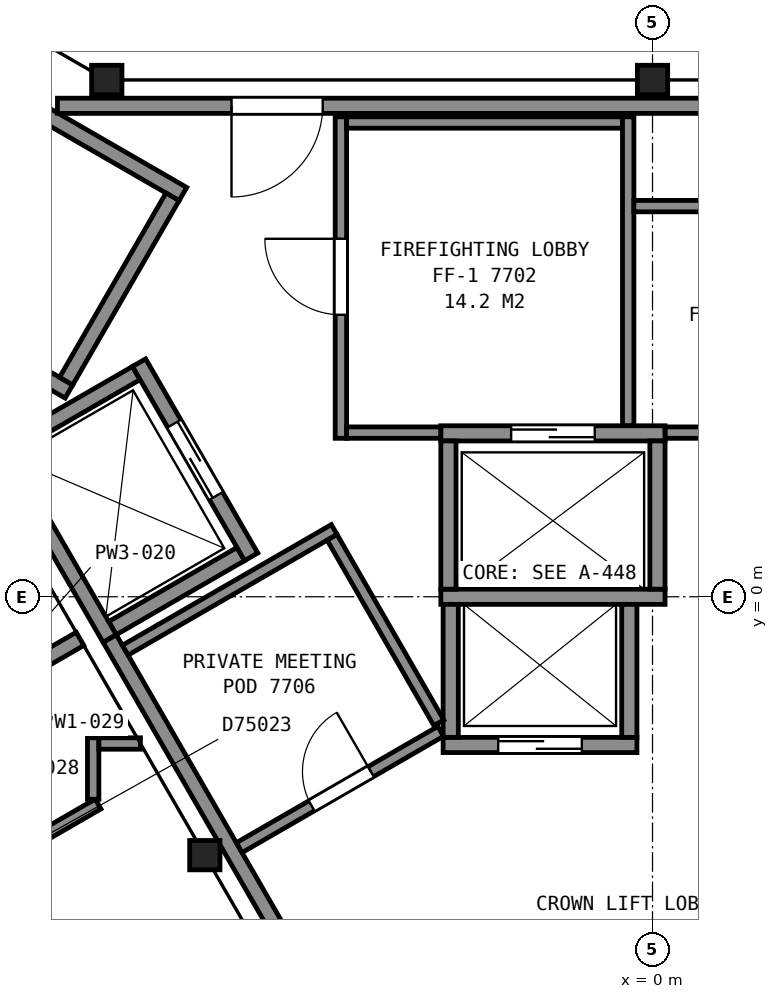
"""IFC4 building model, lengths in metres.
Left out: names, types, materials, properties, quantities, classifications, styles, units other than length and angle.
Written with IfcOpenShell. Run it as: python <this file> out.ifc"""

import sys

from ifc_helpers import new_model, si_unit, direction, frame, frame_2d, origin, origin_2d, place, context, subcontext, project, spatial, rectangle, i_section, extrude, element, fill, save


model = new_model("IFC4")
c1 = context("Model", 3, precision=1e-05, world=origin(), true_north=direction((0.0, 1.0)))
c2 = subcontext(c1, "Body", "Model", "MODEL_VIEW")
j1 = project(units=[si_unit("LENGTHUNIT", "METRE"), si_unit("PLANEANGLEUNIT", "RADIAN")], contexts=[c1])
p1 = place(None, origin())
s1 = spatial("IfcSite", under=j1, at=p1, CompositionType="ELEMENT")
p2 = place(p1, origin())
s2 = spatial("IfcBuilding", under=s1, at=p2, CompositionType="ELEMENT")
p3 = place(p2, frame((0.0, 0.0, 304.7)))
s3 = spatial("IfcBuildingStorey", under=s2, at=p3, CompositionType="ELEMENT", Elevation=304.7)
for number, where, z_axis, x_axis in (
    (1, (0.0, 6.8, 0.0), (0.0, 0.0, 1.0), (1.0, 0.0, 0.0)),
    (2, (-7.18, 6.8, 0.0), (0.0, 0.0, 1.0), (1.0, 0.0, 0.0)),
    (3, (-5.89, -3.4, 0.0), (0.0, 0.0, 1.0), (1.0, 0.0, 0.0)),
):
    element("IfcColumn", number, at=place(p3, frame(where, z_axis=z_axis, x_axis=x_axis)), inside=s3, PredefinedType="COLUMN", context=c2, shape_type="SweptSolid", body=[
        extrude(i_section(OverallWidth=0.399, OverallDepth=0.386, WebThickness=0.021, FlangeThickness=0.033, FilletRadius=0.015, at=origin_2d()), origin(), (0.0, 0.0, 1.0), 3.7),
    ])
for number, where, z_axis, x_axis in (
    (4, (-7.678, 2.701, 0.0), (0.0, 0.0, 1.0), (-0.866, 0.5, 0.0)),
    (5, (-6.178, 5.299, 0.0), (0.0, 0.0, 1.0), (-0.866, 0.5, 0.0)),
):
    element("IfcWall", number, at=place(p3, frame(where, z_axis=z_axis, x_axis=x_axis)), inside=s3, PredefinedType="PARTITIONING", context=c2, shape_type="SweptSolid", body=[
        extrude(rectangle(XDim=7.2, YDim=0.2, at=frame_2d((3.6, 0.0))), origin(), (0.0, 0.0, 1.0), 3.45),
    ])
p4 = place(p3, frame((-6.315, 5.262, 0.0), z_axis=(0.0, 0.0, 1.0), x_axis=(-0.500049511043, -0.865996816683, 0.0)))
e6 = element("IfcWall", 6, at=p4, inside=s3, PredefinedType="PARTITIONING", context=c2, shape_type="SweptSolid", body=[
    extrude(rectangle(XDim=2.8, YDim=0.2, at=frame_2d((1.4, 0.0))), origin(), (0.0, 0.0, 1.0), 3.45),
])
p5 = place(p3, frame((-2.755, -1.95, 0.0), z_axis=(0.0, 0.0, 1.0), x_axis=(1.0, 0.0, 0.0)))
e7 = element("IfcWall", 7, at=p5, inside=s3, PredefinedType="PARTITIONING", context=c2, shape_type="SweptSolid", body=[
    extrude(rectangle(XDim=2.55, YDim=0.2, at=frame_2d((1.275, 0.0))), origin(), (0.0, 0.0, 1.0), 3.7),
])
p6 = place(p5, frame((0.725, 0.0, 0.0)))
e8 = element("IfcOpeningElement", 8, at=p6, cuts=e7, PredefinedType="OPENING", context=c2, shape_type="SweptSolid", body=[
    extrude(rectangle(XDim=1.1, YDim=2.1, at=frame_2d((0.55, 1.05))), frame((0.0, 0.11, 0.0), z_axis=(0.0, -1.0, 0.0), x_axis=(1.0, 0.0, 0.0)), (0.0, 0.0, 1.0), 0.22),
])
p7 = place(p3, frame((-2.785, 0.0, 0.0), z_axis=(0.0, 0.0, 1.0), x_axis=(1.0, 0.0, 0.0)))
e9 = element("IfcWall", 9, at=p7, inside=s3, PredefinedType="PARTITIONING", context=c2, shape_type="SweptSolid", body=[
    extrude(rectangle(XDim=2.95, YDim=0.2, at=frame_2d((1.475, 0.0))), origin(), (0.0, 0.0, 1.0), 3.7),
])
p8 = place(p3, frame((-2.785, 2.15, 0.0), z_axis=(0.0, 0.0, 1.0), x_axis=(1.0, 0.0, 0.0)))
e10 = element("IfcWall", 10, at=p8, inside=s3, PredefinedType="PARTITIONING", context=c2, shape_type="SweptSolid", body=[
    extrude(rectangle(XDim=2.95, YDim=0.2, at=frame_2d((1.475, 0.0))), origin(), (0.0, 0.0, 1.0), 3.7),
])
p9 = place(p8, frame((0.925, 0.0, 0.0)))
e11 = element("IfcOpeningElement", 11, at=p9, cuts=e10, PredefinedType="OPENING", context=c2, shape_type="SweptSolid", body=[
    extrude(rectangle(XDim=1.1, YDim=2.1, at=frame_2d((0.55, 1.05))), frame((0.0, 0.11, 0.0), z_axis=(0.0, -1.0, 0.0), x_axis=(1.0, 0.0, 0.0)), (0.0, 0.0, 1.0), 0.22),
])
for number, where, z_axis, x_axis in (
    (12, (-7.105, -0.413, 0.0), (0.0, 0.0, 1.0), (0.866, 0.5, 0.0)),
    (13, (-8.48, 1.969, 0.0), (0.0, 0.0, 1.0), (0.866, 0.5, 0.0)),
    (14, (0.065, 0.1, 0.0), (0.0, 0.0, 1.0), (0.0, 1.0, 0.0)),
):
    element("IfcWall", number, at=place(p3, frame(where, z_axis=z_axis, x_axis=x_axis)), inside=s3, PredefinedType="PARTITIONING", context=c2, shape_type="SweptSolid", body=[
        extrude(rectangle(XDim=1.95, YDim=0.2, at=frame_2d((0.975, 0.0))), origin(), (0.0, 0.0, 1.0), 3.7),
    ])
for number, where, z_axis, x_axis in (
    (15, (-0.305, -1.85, 0.0), (0.0, 0.0, 1.0), (0.0, 1.0, 0.0)),
    (16, (-2.655, -1.85, 0.0), (0.0, 0.0, 1.0), (0.0, 1.0, 0.0)),
):
    element("IfcWall", number, at=place(p3, frame(where, z_axis=z_axis, x_axis=x_axis)), inside=s3, PredefinedType="PARTITIONING", context=c2, shape_type="SweptSolid", body=[
        extrude(rectangle(XDim=1.75, YDim=0.2, at=frame_2d((0.875, 0.0))), origin(), (0.0, 0.0, 1.0), 3.7),
    ])
p10 = place(p3, frame((-2.685, 0.1, 0.0), z_axis=(0.0, 0.0, 1.0), x_axis=(0.0, 1.0, 0.0)))
e17 = element("IfcWall", 17, at=p10, inside=s3, PredefinedType="PARTITIONING", context=c2, shape_type="SweptSolid", body=[
    extrude(rectangle(XDim=1.95, YDim=0.2, at=frame_2d((0.975, 0.0))), origin(), (0.0, 0.0, 1.0), 3.7),
])
p11 = place(p3, frame((-5.28, 0.525, 0.0), z_axis=(0.0, 0.0, 1.0), x_axis=(-0.500037662692, 0.866003658127, 0.0)))
e18 = element("IfcWall", 18, at=p11, inside=s3, PredefinedType="PARTITIONING", context=c2, shape_type="SweptSolid", body=[
    extrude(rectangle(XDim=2.95, YDim=0.2, at=frame_2d((1.475, 0.0))), origin(), (0.0, 0.0, 1.0), 3.7),
])
p12 = place(p11, frame((0.925, 0.0, 0.0)))
e19 = element("IfcOpeningElement", 19, at=p12, cuts=e18, PredefinedType="OPENING", context=c2, shape_type="SweptSolid", body=[
    extrude(rectangle(XDim=1.1, YDim=2.1, at=frame_2d((0.55, 1.05))), frame((0.0, 0.11, 0.0), z_axis=(0.0, -1.0, 0.0), x_axis=(1.0, 0.0, 0.0)), (0.0, 0.0, 1.0), 0.22),
])
p13 = place(p3, frame((-7.142, -0.55, 0.0), z_axis=(0.0, 0.0, 1.0), x_axis=(-0.49997559174, 0.866039495442, 0.0)))
e20 = element("IfcWall", 20, at=p13, inside=s3, PredefinedType="PARTITIONING", context=c2, shape_type="SweptSolid", body=[
    extrude(rectangle(XDim=2.95, YDim=0.2, at=frame_2d((1.475, 0.0))), origin(), (0.0, 0.0, 1.0), 3.7),
])
p14 = place(p3, frame((7.829, 6.46, 0.0), z_axis=(0.0, 0.0, 1.0), x_axis=(-1.0, 0.0, 0.0)))
e21 = element("IfcWall", 21, at=p14, inside=s3, PredefinedType="PARTITIONING", context=c2, shape_type="SweptSolid", body=[
    extrude(rectangle(XDim=15.658, YDim=0.2, at=frame_2d((7.829, 0.0))), origin(), (0.0, 0.0, 1.0), 3.45),
])
p15 = place(p14, frame((12.168, 0.0, 0.0)))
e22 = element("IfcOpeningElement", 22, at=p15, cuts=e21, PredefinedType="OPENING", context=c2, shape_type="SweptSolid", body=[
    extrude(rectangle(XDim=1.2, YDim=2.1, at=frame_2d((0.6, 1.05))), frame((0.0, 0.11, 0.0), z_axis=(0.0, -1.0, 0.0), x_axis=(1.0, 0.0, 0.0)), (0.0, 0.0, 1.0), 0.22),
])
p16 = place(p3, frame((-7.141, -0.551, 0.0), z_axis=(0.0, 0.0, 1.0), x_axis=(0.500001302854, -0.86602465158, 0.0)))
e23 = element("IfcWall", 23, at=p16, inside=s3, PredefinedType="PARTITIONING", context=c2, shape_type="SweptSolid", body=[
    extrude(rectangle(XDim=6.846, YDim=0.2, at=frame_2d((3.423, 0.0))), origin(), (0.0, 0.0, 1.0), 3.45),
])
p17 = place(p16, frame((4.983, 0.0, 0.0)))
e24 = element("IfcOpeningElement", 24, at=p17, cuts=e23, PredefinedType="OPENING", context=c2, shape_type="SweptSolid", body=[
    extrude(rectangle(XDim=1.2, YDim=2.1, at=frame_2d((0.6, 1.05))), frame((0.0, 0.11, 0.0), z_axis=(0.0, -1.0, 0.0), x_axis=(1.0, 0.0, 0.0)), (0.0, 0.0, 1.0), 0.22),
])
p18 = place(p3, frame((-6.938, -0.703, 0.0), z_axis=(0.0, 0.0, 1.0), x_axis=(0.866029357279, 0.499993152284, 0.0)))
e25 = element("IfcWall", 25, at=p18, inside=s3, PredefinedType="PARTITIONING", context=c2, shape_type="SweptSolid", body=[
    extrude(rectangle(XDim=3.175, YDim=0.15, at=frame_2d((1.587, 0.0))), origin(), (0.0, 0.0, 1.0), 3.45),
])
p19 = place(p3, frame((-5.438, -3.301, 0.0), z_axis=(0.0, 0.0, 1.0), x_axis=(0.865961047596, 0.500111451624, 0.0)))
e26 = element("IfcWall", 26, at=p19, inside=s3, PredefinedType="PARTITIONING", context=c2, shape_type="SweptSolid", body=[
    extrude(rectangle(XDim=3.06, YDim=0.15, at=frame_2d((1.53, 0.0))), origin(), (0.0, 0.0, 1.0), 3.45),
])
p20 = place(p19, frame((1.1, 0.0, 0.0)))
e27 = element("IfcOpeningElement", 27, at=p20, cuts=e26, PredefinedType="OPENING", context=c2, shape_type="SweptSolid", body=[
    extrude(rectangle(XDim=0.9, YDim=2.1, at=frame_2d((0.45, 1.05))), frame((0.0, 0.085, 0.0), z_axis=(0.0, -1.0, 0.0), x_axis=(1.0, 0.0, 0.0)), (0.0, 0.0, 1.0), 0.17),
])
p21 = place(p3, frame((-4.216, 0.782, 0.0), z_axis=(0.0, 0.0, 1.0), x_axis=(0.498733469436, -0.866755401751, 0.0)))
e28 = element("IfcWall", 28, at=p21, inside=s3, PredefinedType="PARTITIONING", context=c2, shape_type="SweptSolid", body=[
    extrude(rectangle(XDim=2.815, YDim=0.15, at=frame_2d((1.407, 0.0))), origin(), (0.0, 0.0, 1.0), 3.45),
])
p22 = place(p3, frame((-4.1, 2.085, 0.0), z_axis=(0.0, 0.0, 1.0), x_axis=(0.0, 1.0, 0.0)))
e29 = element("IfcWall", 29, at=p22, inside=s3, PredefinedType="PARTITIONING", context=c2, shape_type="SweptSolid", body=[
    extrude(rectangle(XDim=4.23, YDim=0.15, at=frame_2d((2.115, 0.0))), origin(), (0.0, 0.0, 1.0), 3.45),
])
p23 = place(p22, frame((1.625, 0.0, 0.0)))
e30 = element("IfcOpeningElement", 30, at=p23, cuts=e29, PredefinedType="OPENING", context=c2, shape_type="SweptSolid", body=[
    extrude(rectangle(XDim=1.0, YDim=2.1, at=frame_2d((0.5, 1.05))), frame((0.0, 0.085, 0.0), z_axis=(0.0, -1.0, 0.0), x_axis=(1.0, 0.0, 0.0)), (0.0, 0.0, 1.0), 0.17),
])
p24 = place(p3, frame((-4.025, 2.16, 0.0), z_axis=(0.0, 0.0, 1.0), x_axis=(1.0, 0.0, 0.0)))
e31 = element("IfcWall", 31, at=p24, inside=s3, PredefinedType="PARTITIONING", context=c2, shape_type="SweptSolid", body=[
    extrude(rectangle(XDim=1.238, YDim=0.15, at=frame_2d((0.619, 0.0))), origin(), (0.0, 0.0, 1.0), 3.45),
])
p25 = place(p3, frame((-4.025, 6.24, 0.0), z_axis=(0.0, 0.0, 1.0), x_axis=(1.0, 0.0, 0.0)))
e32 = element("IfcWall", 32, at=p25, inside=s3, PredefinedType="PARTITIONING", context=c2, shape_type="SweptSolid", body=[
    extrude(rectangle(XDim=3.63, YDim=0.15, at=frame_2d((1.815, 0.0))), origin(), (0.0, 0.0, 1.0), 3.45),
])
p26 = place(p3, frame((-0.32, 2.252, 0.0), z_axis=(0.0, 0.0, 1.0), x_axis=(0.0, 1.0, 0.0)))
e33 = element("IfcWall", 33, at=p26, inside=s3, PredefinedType="PARTITIONING", context=c2, shape_type="SweptSolid", body=[
    extrude(rectangle(XDim=4.063, YDim=0.15, at=frame_2d((2.031, 0.0))), origin(), (0.0, 0.0, 1.0), 3.45),
])
p27 = place(p3, frame((-0.245, 5.14, 0.0), z_axis=(0.0, 0.0, 1.0), x_axis=(1.0, 0.0, 0.0)))
e34 = element("IfcWall", 34, at=p27, inside=s3, PredefinedType="PARTITIONING", context=c2, shape_type="SweptSolid", body=[
    extrude(rectangle(XDim=5.11, YDim=0.15, at=frame_2d((2.555, 0.0))), origin(), (0.0, 0.0, 1.0), 3.45),
])
p28 = place(p27, frame((1.975, 0.0, 0.0)))
e35 = element("IfcOpeningElement", 35, at=p28, cuts=e34, PredefinedType="OPENING", context=c2, shape_type="SweptSolid", body=[
    extrude(rectangle(XDim=1.0, YDim=2.1, at=frame_2d((0.5, 1.05))), frame((0.0, 0.085, 0.0), z_axis=(0.0, -1.0, 0.0), x_axis=(1.0, 0.0, 0.0)), (0.0, 0.0, 1.0), 0.17),
])
p29 = place(p3, frame((0.167, 2.16, 0.0), z_axis=(0.0, 0.0, 1.0), x_axis=(1.0, 0.0, 0.0)))
e36 = element("IfcWall", 36, at=p29, inside=s3, PredefinedType="PARTITIONING", context=c2, shape_type="SweptSolid", body=[
    extrude(rectangle(XDim=1.356, YDim=0.15, at=frame_2d((0.678, 0.0))), origin(), (0.0, 0.0, 1.0), 3.45),
])
p30 = place(p3, frame((-12.205, -5.562, 0.0), z_axis=(0.0, 0.0, 1.0), x_axis=(0.866006351856, 0.500032997455, 0.0)))
e37 = element("IfcWall", 37, at=p30, inside=s3, PredefinedType="PARTITIONING", context=c2, shape_type="SweptSolid", body=[
    extrude(rectangle(XDim=5.671, YDim=0.15, at=frame_2d((2.835, 0.0))), origin(), (0.0, 0.0, 1.0), 2.723),
])
p31 = place(p30, frame((2.935, 0.0, 0.0)))
e38 = element("IfcOpeningElement", 38, at=p31, cuts=e37, PredefinedType="OPENING", context=c2, shape_type="SweptSolid", body=[
    extrude(rectangle(XDim=1.0, YDim=2.1, at=frame_2d((0.5, 1.05))), frame((0.0, 0.085, 0.0), z_axis=(0.0, -1.0, 0.0), x_axis=(1.0, 0.0, 0.0)), (0.0, 0.0, 1.0), 0.17),
])
p32 = place(p3, frame((-10.346, -2.179, 0.0), z_axis=(0.0, 0.0, 1.0), x_axis=(0.86595908408, 0.500114851509, 0.0)))
e39 = element("IfcWall", 39, at=p32, inside=s3, PredefinedType="PARTITIONING", context=c2, shape_type="SweptSolid", body=[
    extrude(rectangle(XDim=3.249, YDim=0.2, at=frame_2d((1.625, 0.0))), origin(), (0.0, 0.0, 1.0), 2.723),
])
p33 = place(p3, frame((-7.359, -2.664, 0.0), z_axis=(0.0, 0.0, 1.0), x_axis=(0.0, 1.0, 0.0)))
e40 = element("IfcWall", 40, at=p33, inside=s3, PredefinedType="PARTITIONING", context=c2, shape_type="SweptSolid", body=[
    extrude(rectangle(XDim=0.808, YDim=0.15, at=frame_2d((0.404, 0.0))), origin(), (0.0, 0.0, 1.0), 2.723),
])
p34 = place(p3, frame((-7.284, -1.931, 0.0), z_axis=(0.0, 0.0, 1.0), x_axis=(1.0, 0.0, 0.0)))
e41 = element("IfcWall", 41, at=p34, inside=s3, PredefinedType="PARTITIONING", context=c2, shape_type="SweptSolid", body=[
    extrude(rectangle(XDim=0.547, YDim=0.15, at=frame_2d((0.273, 0.0))), origin(), (0.0, 0.0, 1.0), 2.723),
])
p35 = place(p6, origin())
e42 = element("IfcDoor", 42, at=p35, inside=s3, OperationType="SLIDING_TO_RIGHT", PredefinedType="DOOR", context=c2, shape_type="SweptSolid", body=[
    extrude(rectangle(XDim=1.1, YDim=2.1, at=frame_2d((0.55, 1.05))), frame((0.0, 0.025, 0.0), z_axis=(0.0, -1.0, 0.0), x_axis=(1.0, 0.0, 0.0)), (0.0, 0.0, 1.0), 0.05),
])
fill(e8, e42)
p36 = place(p9, origin())
e43 = element("IfcDoor", 43, at=p36, inside=s3, OperationType="SLIDING_TO_LEFT", PredefinedType="DOOR", context=c2, shape_type="SweptSolid", body=[
    extrude(rectangle(XDim=1.1, YDim=2.1, at=frame_2d((0.55, 1.05))), frame((0.0, 0.025, 0.0), z_axis=(0.0, -1.0, 0.0), x_axis=(1.0, 0.0, 0.0)), (0.0, 0.0, 1.0), 0.05),
])
fill(e11, e43)
p37 = place(p12, origin())
e44 = element("IfcDoor", 44, at=p37, inside=s3, OperationType="SLIDING_TO_LEFT", PredefinedType="DOOR", context=c2, shape_type="SweptSolid", body=[
    extrude(rectangle(XDim=1.1, YDim=2.1, at=frame_2d((0.55, 1.05))), frame((0.0, 0.025, 0.0), z_axis=(0.0, -1.0, 0.0), x_axis=(1.0, 0.0, 0.0)), (0.0, 0.0, 1.0), 0.05),
])
fill(e19, e44)
p38 = place(p15, origin())
e45 = element("IfcDoor", 45, at=p38, inside=s3, OperationType="SINGLE_SWING_RIGHT", PredefinedType="DOOR", context=c2, shape_type="SweptSolid", body=[
    extrude(rectangle(XDim=1.2, YDim=2.1, at=frame_2d((0.6, 1.05))), frame((0.0, 0.025, 0.0), z_axis=(0.0, -1.0, 0.0), x_axis=(1.0, 0.0, 0.0)), (0.0, 0.0, 1.0), 0.05),
])
fill(e22, e45)
p39 = place(p20, origin())
e46 = element("IfcDoor", 46, at=p39, inside=s3, OperationType="SINGLE_SWING_RIGHT", PredefinedType="DOOR", context=c2, shape_type="SweptSolid", body=[
    extrude(rectangle(XDim=0.9, YDim=2.1, at=frame_2d((0.45, 1.05))), frame((0.0, 0.025, 0.0), z_axis=(0.0, -1.0, 0.0), x_axis=(1.0, 0.0, 0.0)), (0.0, 0.0, 1.0), 0.05),
])
fill(e27, e46)
p40 = place(p23, origin())
e47 = element("IfcDoor", 47, at=p40, inside=s3, OperationType="SINGLE_SWING_RIGHT", PredefinedType="DOOR", context=c2, shape_type="SweptSolid", body=[
    extrude(rectangle(XDim=1.0, YDim=2.1, at=frame_2d((0.5, 1.05))), frame((0.0, 0.025, 0.0), z_axis=(0.0, -1.0, 0.0), x_axis=(1.0, 0.0, 0.0)), (0.0, 0.0, 1.0), 0.05),
])
fill(e30, e47)
save(model, sys.argv[1])
